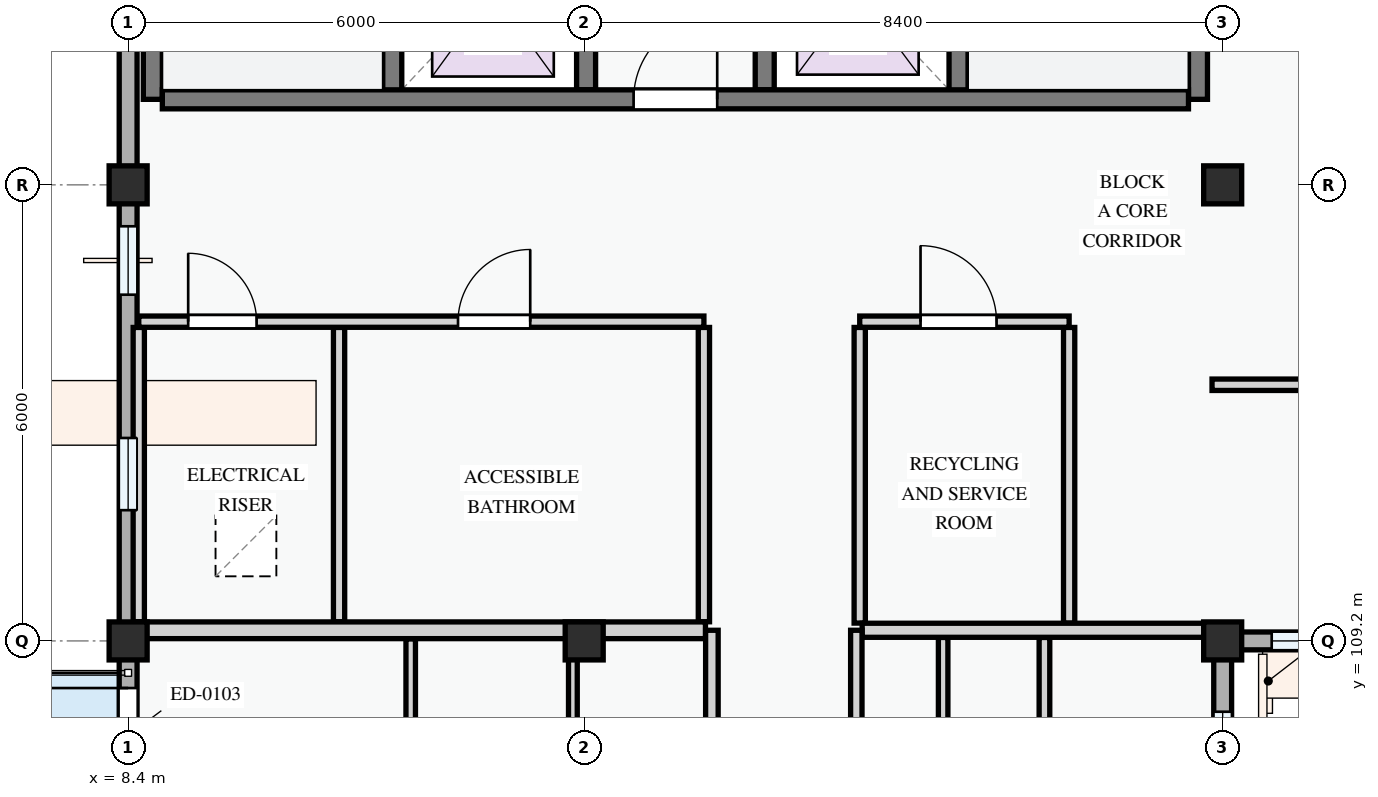
"""IFC4 building model, lengths in metres.
Left out: names, types, materials, properties, quantities, classifications, styles, units other than length and angle.
Written with IfcOpenShell. Run it as: python <this file> out.ifc"""

import sys

from ifc_helpers import new_model, si_unit, direction, frame, frame_2d, origin, origin_2d, place, context, subcontext, project, spatial, rectangle, extrude, element, fill, save


model = new_model("IFC4")
c1 = context("Model", 3, precision=1e-05, world=origin(), true_north=direction((0.0, 1.0)))
c2 = subcontext(c1, "Body", "Model", "MODEL_VIEW")
j1 = project(units=[si_unit("LENGTHUNIT", "METRE"), si_unit("PLANEANGLEUNIT", "RADIAN")], contexts=[c1])
p1 = place(None, origin())
s1 = spatial("IfcSite", under=j1, at=p1, CompositionType="ELEMENT")
p2 = place(p1, origin())
s2 = spatial("IfcBuilding", under=s1, at=p2, CompositionType="ELEMENT")
p3 = place(p2, frame((0.0, 0.0, 44.4)))
s3 = spatial("IfcBuildingStorey", under=s2, at=p3, CompositionType="ELEMENT", Elevation=44.4)
for number, where, z_axis, x_axis in (
    (1, (8.4, 109.2, 0.0), (0.0, 0.0, 1.0), (1.0, 0.0, 0.0)),
    (2, (8.4, 115.2, 0.0), (0.0, 0.0, 1.0), (1.0, 0.0, 0.0)),
    (3, (14.4, 109.2, 0.0), (0.0, 0.0, 1.0), (1.0, 0.0, 0.0)),
    (4, (22.8, 109.2, 0.0), (0.0, 0.0, 1.0), (1.0, 0.0, 0.0)),
    (5, (22.8, 115.2, 0.0), (0.0, 0.0, 1.0), (1.0, 0.0, 0.0)),
):
    element("IfcColumn", number, at=place(p3, frame(where, z_axis=z_axis, x_axis=x_axis)), inside=s3, PredefinedType="COLUMN", context=c2, shape_type="SweptSolid", body=[
        extrude(rectangle(XDim=0.5, YDim=0.5, at=origin_2d()), origin(), (0.0, 0.0, 1.0), 3.3),
    ])
p4 = place(p3, frame((22.8, 109.2, 0.0), z_axis=(0.0, 0.0, 1.0), x_axis=(1.0, 0.0, 0.0)))
e6 = element("IfcWall", 6, at=p4, inside=s3, PredefinedType="STANDARD", context=c2, shape_type="SweptSolid", body=[
    extrude(rectangle(XDim=6.0, YDim=0.235, at=frame_2d((3.0, 0.0))), origin(), (0.0, 0.0, 1.0), 2.525),
])
p5 = place(p4, frame((0.645, 0.0, 0.78)))
e7 = element("IfcOpeningElement", 7, at=p5, cuts=e6, PredefinedType="OPENING", context=c2, shape_type="SweptSolid", body=[
    extrude(rectangle(XDim=1.25, YDim=1.45, at=frame_2d((0.625, 0.725))), frame((0.0, 0.127, 0.0), z_axis=(0.0, -1.0, 0.0), x_axis=(1.0, 0.0, 0.0)), (0.0, 0.0, 1.0), 0.255),
])
p6 = place(p4, frame((3.17, 0.0, 0.78)))
e8 = element("IfcOpeningElement", 8, at=p6, cuts=e6, PredefinedType="OPENING", context=c2, shape_type="SweptSolid", body=[
    extrude(rectangle(XDim=1.82, YDim=1.46, at=frame_2d((0.91, 0.73))), frame((0.0, 0.127, 0.0), z_axis=(0.0, -1.0, 0.0), x_axis=(1.0, 0.0, 0.0)), (0.0, 0.0, 1.0), 0.255),
])
p7 = place(p3, frame((8.4, 123.6, 0.0), z_axis=(0.0, 0.0, 1.0), x_axis=(0.0, -1.0, 0.0)))
e9 = element("IfcWall", 9, at=p7, inside=s3, PredefinedType="STANDARD", context=c2, shape_type="SweptSolid", body=[
    extrude(rectangle(XDim=8.4, YDim=0.235, at=frame_2d((4.2, 0.0))), origin(), (0.0, 0.0, 1.0), 2.425),
])
p8 = place(p7, frame((1.221, 0.0, 0.78)))
e10 = element("IfcOpeningElement", 10, at=p8, cuts=e9, PredefinedType="OPENING", context=c2, shape_type="SweptSolid", body=[
    extrude(rectangle(XDim=1.55, YDim=1.4, at=frame_2d((0.775, 0.7))), frame((0.0, 0.127, 0.0), z_axis=(0.0, -1.0, 0.0), x_axis=(1.0, 0.0, 0.0)), (0.0, 0.0, 1.0), 0.255),
])
p9 = place(p7, frame((4.944, 0.0, 0.78)))
e11 = element("IfcOpeningElement", 11, at=p9, cuts=e9, PredefinedType="OPENING", context=c2, shape_type="SweptSolid", body=[
    extrude(rectangle(XDim=1.05, YDim=1.2, at=frame_2d((0.525, 0.6))), frame((0.0, 0.127, 0.0), z_axis=(0.0, -1.0, 0.0), x_axis=(1.0, 0.0, 0.0)), (0.0, 0.0, 1.0), 0.255),
])
p10 = place(p3, frame((8.4, 115.2, 0.0), z_axis=(0.0, 0.0, 1.0), x_axis=(0.0, -1.0, 0.0)))
e12 = element("IfcWall", 12, at=p10, inside=s3, PredefinedType="STANDARD", context=c2, shape_type="SweptSolid", body=[
    extrude(rectangle(XDim=6.0, YDim=0.235, at=frame_2d((3.0, 0.0))), origin(), (0.0, 0.0, 1.0), 2.575),
])
p11 = place(p10, frame((0.545, 0.0, 0.78)))
e13 = element("IfcOpeningElement", 13, at=p11, cuts=e12, PredefinedType="OPENING", context=c2, shape_type="SweptSolid", body=[
    extrude(rectangle(XDim=0.9, YDim=1.2, at=frame_2d((0.45, 0.6))), frame((0.0, 0.127, 0.0), z_axis=(0.0, -1.0, 0.0), x_axis=(1.0, 0.0, 0.0)), (0.0, 0.0, 1.0), 0.255),
])
p12 = place(p10, frame((3.33, 0.0, 0.78)))
e14 = element("IfcOpeningElement", 14, at=p12, cuts=e12, PredefinedType="OPENING", context=c2, shape_type="SweptSolid", body=[
    extrude(rectangle(XDim=0.95, YDim=1.15, at=frame_2d((0.475, 0.575))), frame((0.0, 0.127, 0.0), z_axis=(0.0, -1.0, 0.0), x_axis=(1.0, 0.0, 0.0)), (0.0, 0.0, 1.0), 0.255),
])
p13 = place(p3, frame((8.4, 109.2, 0.0), z_axis=(0.0, 0.0, 1.0), x_axis=(0.0, -1.0, 0.0)))
e15 = element("IfcWall", 15, at=p13, inside=s3, PredefinedType="STANDARD", context=c2, shape_type="SweptSolid", body=[
    extrude(rectangle(XDim=8.4, YDim=0.235, at=frame_2d((4.2, 0.0))), origin(), (0.0, 0.0, 1.0), 2.425),
])
p14 = place(p13, frame((0.62, 0.0, 0.0)))
e16 = element("IfcOpeningElement", 16, at=p14, cuts=e15, PredefinedType="OPENING", context=c2, shape_type="SweptSolid", body=[
    extrude(rectangle(XDim=1.25, YDim=2.2, at=frame_2d((0.625, 1.1))), frame((0.0, 0.127, 0.0), z_axis=(0.0, -1.0, 0.0), x_axis=(1.0, 0.0, 0.0)), (0.0, 0.0, 1.0), 0.255),
])
p15 = place(p13, frame((2.292, 0.0, 0.78)))
e17 = element("IfcOpeningElement", 17, at=p15, cuts=e15, PredefinedType="OPENING", context=c2, shape_type="SweptSolid", body=[
    extrude(rectangle(XDim=1.68, YDim=1.46, at=frame_2d((0.84, 0.73))), frame((0.0, 0.127, 0.0), z_axis=(0.0, -1.0, 0.0), x_axis=(1.0, 0.0, 0.0)), (0.0, 0.0, 1.0), 0.255),
])
p16 = place(p13, frame((4.817, 0.0, 0.78)))
e18 = element("IfcOpeningElement", 18, at=p16, cuts=e15, PredefinedType="OPENING", context=c2, shape_type="SweptSolid", body=[
    extrude(rectangle(XDim=1.2, YDim=1.35, at=frame_2d((0.6, 0.675))), frame((0.0, 0.127, 0.0), z_axis=(0.0, -1.0, 0.0), x_axis=(1.0, 0.0, 0.0)), (0.0, 0.0, 1.0), 0.255),
])
p17 = place(p13, frame((6.945, 0.0, 0.78)))
e19 = element("IfcOpeningElement", 19, at=p17, cuts=e15, PredefinedType="OPENING", context=c2, shape_type="SweptSolid", body=[
    extrude(rectangle(XDim=0.95, YDim=1.15, at=frame_2d((0.475, 0.575))), frame((0.0, 0.127, 0.0), z_axis=(0.0, -1.0, 0.0), x_axis=(1.0, 0.0, 0.0)), (0.0, 0.0, 1.0), 0.255),
])
p18 = place(p3, frame((22.8, 100.8, 0.0), z_axis=(0.0, 0.0, 1.0), x_axis=(0.0, 1.0, 0.0)))
e20 = element("IfcWall", 20, at=p18, inside=s3, PredefinedType="STANDARD", context=c2, shape_type="SweptSolid", body=[
    extrude(rectangle(XDim=8.4, YDim=0.235, at=frame_2d((4.2, 0.0))), origin(), (0.0, 0.0, 1.0), 2.425),
])
p19 = place(p18, frame((0.517, 0.0, 0.78)))
e21 = element("IfcOpeningElement", 21, at=p19, cuts=e20, PredefinedType="OPENING", context=c2, shape_type="SweptSolid", body=[
    extrude(rectangle(XDim=0.9, YDim=1.2, at=frame_2d((0.45, 0.6))), frame((0.0, 0.127, 0.0), z_axis=(0.0, -1.0, 0.0), x_axis=(1.0, 0.0, 0.0)), (0.0, 0.0, 1.0), 0.255),
])
p20 = place(p18, frame((2.655, 0.0, 0.78)))
e22 = element("IfcOpeningElement", 22, at=p20, cuts=e20, PredefinedType="OPENING", context=c2, shape_type="SweptSolid", body=[
    extrude(rectangle(XDim=1.48, YDim=1.52, at=frame_2d((0.74, 0.76))), frame((0.0, 0.127, 0.0), z_axis=(0.0, -1.0, 0.0), x_axis=(1.0, 0.0, 0.0)), (0.0, 0.0, 1.0), 0.255),
])
p21 = place(p18, frame((5.648, 0.0, 0.78)))
e23 = element("IfcOpeningElement", 23, at=p21, cuts=e20, PredefinedType="OPENING", context=c2, shape_type="SweptSolid", body=[
    extrude(rectangle(XDim=1.82, YDim=1.46, at=frame_2d((0.91, 0.73))), frame((0.0, 0.127, 0.0), z_axis=(0.0, -1.0, 0.0), x_axis=(1.0, 0.0, 0.0)), (0.0, 0.0, 1.0), 0.255),
])
p22 = place(p3, frame((11.875, 123.25, 0.0), z_axis=(0.0, 0.0, 1.0), x_axis=(0.0, -1.0, 0.0)))
e24 = element("IfcWall", 24, at=p22, inside=s3, PredefinedType="SHEAR", context=c2, shape_type="SweptSolid", body=[
    extrude(rectangle(XDim=6.925, YDim=0.25, at=frame_2d((3.462, 0.0))), origin(), (0.0, 0.0, 1.0), 3.0),
])
p23 = place(p22, frame((0.35, 0.0, 0.0)))
e25 = element("IfcOpeningElement", 25, at=p23, cuts=e24, PredefinedType="OPENING", context=c2, shape_type="SweptSolid", body=[
    extrude(rectangle(XDim=0.95, YDim=2.1, at=frame_2d((0.475, 1.05))), frame((0.0, 0.135, 0.0), z_axis=(0.0, -1.0, 0.0), x_axis=(1.0, 0.0, 0.0)), (0.0, 0.0, 1.0), 0.27),
])
p24 = place(p3, frame((8.725, 123.4, 0.0), z_axis=(0.0, 0.0, 1.0), x_axis=(0.0, -1.0, 0.0)))
e26 = element("IfcWall", 26, at=p24, inside=s3, PredefinedType="SHEAR", context=c2, shape_type="SweptSolid", body=[
    extrude(rectangle(XDim=7.075, YDim=0.25, at=frame_2d((3.538, 0.0))), origin(), (0.0, 0.0, 1.0), 3.0),
])
p25 = place(p3, frame((22.475, 123.25, 0.0), z_axis=(0.0, 0.0, 1.0), x_axis=(0.0, -1.0, 0.0)))
e27 = element("IfcWall", 27, at=p25, inside=s3, PredefinedType="SHEAR", context=c2, shape_type="SweptSolid", body=[
    extrude(rectangle(XDim=6.925, YDim=0.25, at=frame_2d((3.462, 0.0))), origin(), (0.0, 0.0, 1.0), 3.0),
])
p26 = place(p3, frame((19.325, 123.25, 0.0), z_axis=(0.0, 0.0, 1.0), x_axis=(0.0, -1.0, 0.0)))
e28 = element("IfcWall", 28, at=p26, inside=s3, PredefinedType="SHEAR", context=c2, shape_type="SweptSolid", body=[
    extrude(rectangle(XDim=6.925, YDim=0.25, at=frame_2d((3.462, 0.0))), origin(), (0.0, 0.0, 1.0), 3.0),
])
p27 = place(p26, frame((0.35, 0.0, 0.0)))
e29 = element("IfcOpeningElement", 29, at=p27, cuts=e28, PredefinedType="OPENING", context=c2, shape_type="SweptSolid", body=[
    extrude(rectangle(XDim=0.95, YDim=2.1, at=frame_2d((0.475, 1.05))), frame((0.0, 0.135, 0.0), z_axis=(0.0, -1.0, 0.0), x_axis=(1.0, 0.0, 0.0)), (0.0, 0.0, 1.0), 0.27),
])
for number, where, z_axis, x_axis in (
    (30, (14.425, 118.875, 0.0), (0.0, 0.0, 1.0), (0.0, -1.0, 0.0)),
    (31, (16.775, 118.875, 0.0), (0.0, 0.0, 1.0), (0.0, -1.0, 0.0)),
):
    element("IfcWall", number, at=place(p3, frame(where, z_axis=z_axis, x_axis=x_axis)), inside=s3, PredefinedType="SHEAR", context=c2, shape_type="SweptSolid", body=[
        extrude(rectangle(XDim=2.425, YDim=0.25, at=frame_2d((1.212, 0.0))), origin(), (0.0, 0.0, 1.0), 3.0),
    ])
p28 = place(p3, frame((8.85, 116.325, 0.0), z_axis=(0.0, 0.0, 1.0), x_axis=(1.0, 0.0, 0.0)))
e32 = element("IfcWall", 32, at=p28, inside=s3, PredefinedType="SHEAR", context=c2, shape_type="SweptSolid", body=[
    extrude(rectangle(XDim=13.5, YDim=0.25, at=frame_2d((6.75, 0.0))), origin(), (0.0, 0.0, 1.0), 3.0),
])
p29 = place(p28, frame((6.2, 0.0, 0.0)))
e33 = element("IfcOpeningElement", 33, at=p29, cuts=e32, PredefinedType="OPENING", context=c2, shape_type="SweptSolid", body=[
    extrude(rectangle(XDim=1.1, YDim=2.15, at=frame_2d((0.55, 1.075))), frame((0.0, 0.135, 0.0), z_axis=(0.0, -1.0, 0.0), x_axis=(1.0, 0.0, 0.0)), (0.0, 0.0, 1.0), 0.27),
])
p30 = place(p3, frame((8.54, 113.324, 0.0), z_axis=(0.0, 0.0, 1.0), x_axis=(0.0, -1.0, 0.0)))
e34 = element("IfcWall", 34, at=p30, inside=s3, PredefinedType="PARTITIONING", context=c2, shape_type="SweptSolid", body=[
    extrude(rectangle(XDim=3.872, YDim=0.148, at=frame_2d((1.936, 0.0))), origin(), (0.0, 0.0, 1.0), 2.575),
])
for number, where, z_axis, x_axis in (
    (35, (11.175, 113.324, 0.0), (0.0, 0.0, 1.0), (0.0, -1.0, 0.0)),
    (36, (15.975, 113.324, 0.0), (0.0, 0.0, 1.0), (0.0, -1.0, 0.0)),
):
    element("IfcWall", number, at=place(p3, frame(where, z_axis=z_axis, x_axis=x_axis)), inside=s3, PredefinedType="PARTITIONING", context=c2, shape_type="SweptSolid", body=[
        extrude(rectangle(XDim=3.872, YDim=0.148, at=frame_2d((1.936, 0.0))), origin(), (0.0, 0.0, 1.0), 3.0),
    ])
for number, where, z_axis, x_axis in (
    (37, (18.025, 113.324, 0.0), (0.0, 0.0, 1.0), (0.0, -1.0, 0.0)),
    (38, (20.78, 113.324, 0.0), (0.0, 0.0, 1.0), (0.0, -1.0, 0.0)),
):
    element("IfcWall", number, at=place(p3, frame(where, z_axis=z_axis, x_axis=x_axis)), inside=s3, PredefinedType="PARTITIONING", context=c2, shape_type="SweptSolid", body=[
        extrude(rectangle(XDim=3.889, YDim=0.148, at=frame_2d((1.945, 0.0))), origin(), (0.0, 0.0, 1.0), 3.0),
    ])
p31 = place(p3, frame((8.54, 113.4, 0.0), z_axis=(0.0, 0.0, 1.0), x_axis=(1.0, 0.0, 0.0)))
e39 = element("IfcWall", 39, at=p31, inside=s3, PredefinedType="PARTITIONING", context=c2, shape_type="SweptSolid", body=[
    extrude(rectangle(XDim=7.435, YDim=0.148, at=frame_2d((3.718, 0.0))), origin(), (0.0, 0.0, 1.0), 3.0),
])
p32 = place(p31, frame((0.65, 0.0, 0.0)))
e40 = element("IfcOpeningElement", 40, at=p32, cuts=e39, PredefinedType="OPENING", context=c2, shape_type="SweptSolid", body=[
    extrude(rectangle(XDim=0.9, YDim=2.1, at=frame_2d((0.45, 1.05))), frame((0.0, 0.084, 0.0), z_axis=(0.0, -1.0, 0.0), x_axis=(1.0, 0.0, 0.0)), (0.0, 0.0, 1.0), 0.168),
])
p33 = place(p31, frame((4.2, 0.0, 0.0)))
e41 = element("IfcOpeningElement", 41, at=p33, cuts=e39, PredefinedType="OPENING", context=c2, shape_type="SweptSolid", body=[
    extrude(rectangle(XDim=0.95, YDim=2.1, at=frame_2d((0.475, 1.05))), frame((0.0, 0.084, 0.0), z_axis=(0.0, -1.0, 0.0), x_axis=(1.0, 0.0, 0.0)), (0.0, 0.0, 1.0), 0.168),
])
p34 = place(p3, frame((18.025, 113.4, 0.0), z_axis=(0.0, 0.0, 1.0), x_axis=(1.0, 0.0, 0.0)))
e42 = element("IfcWall", 42, at=p34, inside=s3, PredefinedType="PARTITIONING", context=c2, shape_type="SweptSolid", body=[
    extrude(rectangle(XDim=2.755, YDim=0.148, at=frame_2d((1.377, 0.0))), origin(), (0.0, 0.0, 1.0), 3.0),
])
p35 = place(p34, frame((0.8, 0.0, 0.0)))
e43 = element("IfcOpeningElement", 43, at=p35, cuts=e42, PredefinedType="OPENING", context=c2, shape_type="SweptSolid", body=[
    extrude(rectangle(XDim=1.0, YDim=2.15, at=frame_2d((0.5, 1.075))), frame((0.0, 0.084, 0.0), z_axis=(0.0, -1.0, 0.0), x_axis=(1.0, 0.0, 0.0)), (0.0, 0.0, 1.0), 0.168),
])
p36 = place(p3, frame((22.66, 112.57, 0.0), z_axis=(0.0, 0.0, 1.0), x_axis=(1.0, 0.0, 0.0)))
e44 = element("IfcWall", 44, at=p36, inside=s3, PredefinedType="PARTITIONING", context=c2, shape_type="SweptSolid", body=[
    extrude(rectangle(XDim=2.406, YDim=0.15, at=frame_2d((1.203, 0.0))), origin(), (0.0, 0.0, 1.0), 3.0),
])
p37 = place(p3, frame((12.118, 102.642, 0.0), z_axis=(0.0, 0.0, 1.0), x_axis=(0.0, 1.0, 0.0)))
e45 = element("IfcWall", 45, at=p37, inside=s3, PredefinedType="PARTITIONING", context=c2, shape_type="SweptSolid", body=[
    extrude(rectangle(XDim=6.586, YDim=0.125, at=frame_2d((3.293, 0.0))), origin(), (0.0, 0.0, 1.0), 3.0),
])
p38 = place(p3, frame((14.251, 102.642, 0.0), z_axis=(0.0, 0.0, 1.0), x_axis=(0.0, 1.0, 0.0)))
e46 = element("IfcWall", 46, at=p38, inside=s3, PredefinedType="PARTITIONING", context=c2, shape_type="SweptSolid", body=[
    extrude(rectangle(XDim=6.586, YDim=0.115, at=frame_2d((3.293, 0.0))), origin(), (0.0, 0.0, 1.0), 2.425),
])
p39 = place(p3, frame((20.455, 102.595, 0.0), z_axis=(0.0, 0.0, 1.0), x_axis=(0.0, 1.0, 0.0)))
e47 = element("IfcWall", 47, at=p39, inside=s3, PredefinedType="PARTITIONING", context=c2, shape_type="SweptSolid", body=[
    extrude(rectangle(XDim=6.65, YDim=0.14, at=frame_2d((3.325, 0.0))), origin(), (0.0, 0.0, 1.0), 3.0),
])
p40 = place(p3, frame((19.122, 102.595, 0.0), z_axis=(0.0, 0.0, 1.0), x_axis=(0.0, 1.0, 0.0)))
e48 = element("IfcWall", 48, at=p40, inside=s3, PredefinedType="PARTITIONING", context=c2, shape_type="SweptSolid", body=[
    extrude(rectangle(XDim=6.65, YDim=0.125, at=frame_2d((3.325, 0.0))), origin(), (0.0, 0.0, 1.0), 3.0),
])
p41 = place(p3, frame((8.52, 109.34, 0.0), z_axis=(0.0, 0.0, 1.0), x_axis=(1.0, 0.0, 0.0)))
e49 = element("IfcWall", 49, at=p41, inside=s3, PredefinedType="PARTITIONING", context=c2, shape_type="SweptSolid", body=[
    extrude(rectangle(XDim=7.476, YDim=0.22, at=frame_2d((3.738, 0.0))), origin(), (0.0, 0.0, 1.0), 2.375),
])
p42 = place(p3, frame((18.057, 109.34, 0.0), z_axis=(0.0, 0.0, 1.0), x_axis=(1.0, 0.0, 0.0)))
e50 = element("IfcWall", 50, at=p42, inside=s3, PredefinedType="PARTITIONING", context=c2, shape_type="SweptSolid", body=[
    extrude(rectangle(XDim=4.683, YDim=0.185, at=frame_2d((2.342, 0.0))), origin(), (0.0, 0.0, 1.0), 2.375),
])
p43 = place(p3, frame((16.08, 86.46, 0.0), z_axis=(0.0, 0.0, 1.0), x_axis=(0.0, 1.0, 0.0)))
e51 = element("IfcWall", 51, at=p43, inside=s3, PredefinedType="PARTITIONING", context=c2, shape_type="SweptSolid", body=[
    extrude(rectangle(XDim=22.88, YDim=0.165, at=frame_2d((11.44, 0.0))), origin(), (0.0, 0.0, 1.0), 3.0),
])
p44 = place(p43, frame((2.06, 0.0, 0.0)))
e52 = element("IfcOpeningElement", 52, at=p44, cuts=e51, PredefinedType="OPENING", context=c2, shape_type="SweptSolid", body=[
    extrude(rectangle(XDim=0.96, YDim=2.12, at=frame_2d((0.48, 1.06))), frame((0.0, 0.093, 0.0), z_axis=(0.0, -1.0, 0.0), x_axis=(1.0, 0.0, 0.0)), (0.0, 0.0, 1.0), 0.185),
])
p45 = place(p43, frame((10.845, 0.0, 0.0)))
e53 = element("IfcOpeningElement", 53, at=p45, cuts=e51, PredefinedType="OPENING", context=c2, shape_type="SweptSolid", body=[
    extrude(rectangle(XDim=0.92, YDim=2.1, at=frame_2d((0.46, 1.05))), frame((0.0, 0.093, 0.0), z_axis=(0.0, -1.0, 0.0), x_axis=(1.0, 0.0, 0.0)), (0.0, 0.0, 1.0), 0.185),
])
p46 = place(p3, frame((17.98, 86.46, 0.0), z_axis=(0.0, 0.0, 1.0), x_axis=(0.0, 1.0, 0.0)))
e54 = element("IfcWall", 54, at=p46, inside=s3, PredefinedType="PARTITIONING", context=c2, shape_type="SweptSolid", body=[
    extrude(rectangle(XDim=22.88, YDim=0.15, at=frame_2d((11.44, 0.0))), origin(), (0.0, 0.0, 1.0), 3.0),
])
p47 = place(p46, frame((1.929, 0.0, 0.0)))
e55 = element("IfcOpeningElement", 55, at=p47, cuts=e54, PredefinedType="OPENING", context=c2, shape_type="SweptSolid", body=[
    extrude(rectangle(XDim=0.92, YDim=2.1, at=frame_2d((0.46, 1.05))), frame((0.0, 0.085, 0.0), z_axis=(0.0, -1.0, 0.0), x_axis=(1.0, 0.0, 0.0)), (0.0, 0.0, 1.0), 0.17),
])
p48 = place(p46, frame((10.832, 0.0, 0.0)))
e56 = element("IfcOpeningElement", 56, at=p48, cuts=e54, PredefinedType="OPENING", context=c2, shape_type="SweptSolid", body=[
    extrude(rectangle(XDim=0.92, YDim=2.1, at=frame_2d((0.46, 1.05))), frame((0.0, 0.085, 0.0), z_axis=(0.0, -1.0, 0.0), x_axis=(1.0, 0.0, 0.0)), (0.0, 0.0, 1.0), 0.17),
])
p49 = place(p5, origin())
e57 = element("IfcWindow", 57, at=p49, inside=s3, PartitioningType="SINGLE_PANEL", PredefinedType="WINDOW", context=c2, shape_type="SweptSolid", body=[
    extrude(rectangle(XDim=1.25, YDim=1.45, at=frame_2d((0.625, 0.725))), frame((0.0, 0.03, 0.0), z_axis=(0.0, -1.0, 0.0), x_axis=(1.0, 0.0, 0.0)), (0.0, 0.0, 1.0), 0.06),
])
fill(e7, e57)
p50 = place(p11, origin())
e58 = element("IfcWindow", 58, at=p50, inside=s3, PartitioningType="SINGLE_PANEL", PredefinedType="WINDOW", context=c2, shape_type="SweptSolid", body=[
    extrude(rectangle(XDim=0.9, YDim=1.2, at=frame_2d((0.45, 0.6))), frame((0.0, 0.03, 0.0), z_axis=(0.0, -1.0, 0.0), x_axis=(1.0, 0.0, 0.0)), (0.0, 0.0, 1.0), 0.06),
])
fill(e13, e58)
p51 = place(p12, origin())
e59 = element("IfcWindow", 59, at=p51, inside=s3, PartitioningType="SINGLE_PANEL", PredefinedType="WINDOW", context=c2, shape_type="SweptSolid", body=[
    extrude(rectangle(XDim=0.95, YDim=1.15, at=frame_2d((0.475, 0.575))), frame((0.0, 0.03, 0.0), z_axis=(0.0, -1.0, 0.0), x_axis=(1.0, 0.0, 0.0)), (0.0, 0.0, 1.0), 0.06),
])
fill(e14, e59)
p52 = place(p14, frame((1.25, 0.0, 0.0), z_axis=(0.0, 0.0, 1.0), x_axis=(-1.0, 0.0, 0.0)))
e60 = element("IfcDoor", 60, at=p52, inside=s3, OperationType="SINGLE_SWING_RIGHT", PredefinedType="DOOR", context=c2, shape_type="SweptSolid", body=[
    extrude(rectangle(XDim=1.25, YDim=2.2, at=frame_2d((0.625, 1.1))), frame((0.0, 0.025, 0.0), z_axis=(0.0, -1.0, 0.0), x_axis=(1.0, 0.0, 0.0)), (0.0, 0.0, 1.0), 0.05),
])
fill(e16, e60)
p53 = place(p21, origin())
e61 = element("IfcWindow", 61, at=p53, inside=s3, PartitioningType="DOUBLE_PANEL_VERTICAL", PredefinedType="WINDOW", context=c2, shape_type="SweptSolid", body=[
    extrude(rectangle(XDim=1.82, YDim=1.46, at=frame_2d((0.91, 0.73))), frame((0.0, 0.03, 0.0), z_axis=(0.0, -1.0, 0.0), x_axis=(1.0, 0.0, 0.0)), (0.0, 0.0, 1.0), 0.06),
])
fill(e23, e61)
p54 = place(p29, origin())
e62 = element("IfcDoor", 62, at=p54, inside=s3, OperationType="SINGLE_SWING_RIGHT", PredefinedType="DOOR", context=c2, shape_type="SweptSolid", body=[
    extrude(rectangle(XDim=1.1, YDim=2.15, at=frame_2d((0.55, 1.075))), frame((0.0, 0.025, 0.0), z_axis=(0.0, -1.0, 0.0), x_axis=(1.0, 0.0, 0.0)), (0.0, 0.0, 1.0), 0.05),
])
fill(e33, e62)
p55 = place(p32, origin())
e63 = element("IfcDoor", 63, at=p55, inside=s3, OperationType="SINGLE_SWING_LEFT", PredefinedType="DOOR", context=c2, shape_type="SweptSolid", body=[
    extrude(rectangle(XDim=0.9, YDim=2.1, at=frame_2d((0.45, 1.05))), frame((0.0, 0.025, 0.0), z_axis=(0.0, -1.0, 0.0), x_axis=(1.0, 0.0, 0.0)), (0.0, 0.0, 1.0), 0.05),
])
fill(e40, e63)
p56 = place(p33, origin())
e64 = element("IfcDoor", 64, at=p56, inside=s3, OperationType="SINGLE_SWING_RIGHT", PredefinedType="DOOR", context=c2, shape_type="SweptSolid", body=[
    extrude(rectangle(XDim=0.95, YDim=2.1, at=frame_2d((0.475, 1.05))), frame((0.0, 0.025, 0.0), z_axis=(0.0, -1.0, 0.0), x_axis=(1.0, 0.0, 0.0)), (0.0, 0.0, 1.0), 0.05),
])
fill(e41, e64)
p57 = place(p35, origin())
e65 = element("IfcDoor", 65, at=p57, inside=s3, OperationType="SINGLE_SWING_LEFT", PredefinedType="DOOR", context=c2, shape_type="SweptSolid", body=[
    extrude(rectangle(XDim=1.0, YDim=2.15, at=frame_2d((0.5, 1.075))), frame((0.0, 0.025, 0.0), z_axis=(0.0, -1.0, 0.0), x_axis=(1.0, 0.0, 0.0)), (0.0, 0.0, 1.0), 0.05),
])
fill(e43, e65)
save(model, sys.argv[1])
